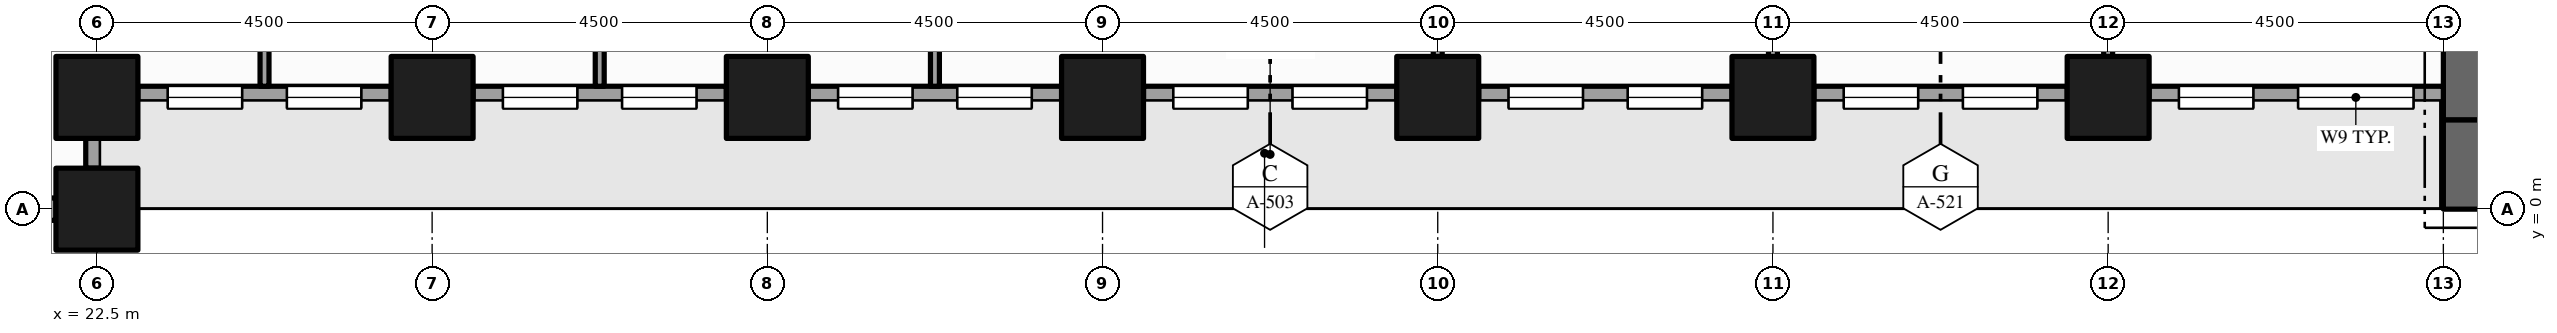
"""IFC4 building model, lengths in metres.
Left out: names, types, materials, properties, quantities, classifications, styles, units other than length and angle.
Written with IfcOpenShell. Run it as: python <this file> out.ifc"""

import sys

from ifc_helpers import new_model, si_unit, direction, frame, frame_2d, origin, origin_2d, place, context, subcontext, project, spatial, rectangle, hollow_rectangle, extrude, element, fill, save


model = new_model("IFC4")
c1 = context("Model", 3, precision=1e-05, world=origin(), true_north=direction((0.0, 1.0)))
c2 = subcontext(c1, "Body", "Model", "MODEL_VIEW")
j1 = project(units=[si_unit("LENGTHUNIT", "METRE"), si_unit("PLANEANGLEUNIT", "RADIAN")], contexts=[c1])
p1 = place(None, origin())
s1 = spatial("IfcSite", under=j1, at=p1, CompositionType="ELEMENT")
p2 = place(p1, origin())
s2 = spatial("IfcBuilding", under=s1, at=p2, CompositionType="ELEMENT")
p3 = place(p2, frame((0.0, 0.0, 29.0)))
s3 = spatial("IfcBuildingStorey", under=s2, at=p3, CompositionType="ELEMENT", Elevation=29.0)
p4 = place(p3, frame((67.5, 0.6, -0.15), z_axis=(0.0, 0.0, 1.0), x_axis=(-1.0, 0.0, 0.0)))
e1 = element("IfcWall", 1, at=p4, inside=s3, PredefinedType="SHEAR", context=c2, shape_type="SweptSolid", body=[
    extrude(rectangle(XDim=13.5, YDim=1.2, at=frame_2d((6.75, 0.0))), origin(), (0.0, 0.0, 1.0), 4.0),
])
p5 = place(p3, frame((54.6, 1.2, -0.15), z_axis=(0.0, 0.0, 1.0), x_axis=(0.0, 1.0, 0.0)))
e2 = element("IfcWall", 2, at=p5, inside=s3, PredefinedType="SHEAR", context=c2, shape_type="SweptSolid", body=[
    extrude(rectangle(XDim=20.1, YDim=1.2, at=frame_2d((10.05, 0.0))), origin(), (0.0, 0.0, 1.0), 4.0),
])
p6 = place(p5, frame((5.9, 0.0, 0.15)))
e3 = element("IfcOpeningElement", 3, at=p6, cuts=e2, PredefinedType="OPENING", context=c2, shape_type="SweptSolid", body=[
    extrude(rectangle(XDim=1.8, YDim=2.1, at=frame_2d((0.9, 1.05))), frame((0.0, 0.61, 0.0), z_axis=(0.0, -1.0, 0.0), x_axis=(1.0, 0.0, 0.0)), (0.0, 0.0, 1.0), 1.22),
])
p7 = place(p5, frame((11.95, 0.0, 0.15)))
e4 = element("IfcOpeningElement", 4, at=p7, cuts=e2, PredefinedType="OPENING", context=c2, shape_type="SweptSolid", body=[
    extrude(rectangle(XDim=1.1, YDim=2.1, at=frame_2d((0.55, 1.05))), frame((0.0, 0.61, 0.0), z_axis=(0.0, -1.0, 0.0), x_axis=(1.0, 0.0, 0.0)), (0.0, 0.0, 1.0), 1.22),
])
p8 = place(p5, frame((0.95, 0.0, 0.15)))
e5 = element("IfcOpeningElement", 5, at=p8, cuts=e2, PredefinedType="OPENING", context=c2, shape_type="SweptSolid", body=[
    extrude(rectangle(XDim=1.1, YDim=2.1, at=frame_2d((0.55, 1.05))), frame((0.0, 0.61, 0.0), z_axis=(0.0, -1.0, 0.0), x_axis=(1.0, 0.0, 0.0)), (0.0, 0.0, 1.0), 1.22),
])
p9 = place(p5, frame((18.15, 0.0, 0.15)))
e6 = element("IfcOpeningElement", 6, at=p9, cuts=e2, PredefinedType="OPENING", context=c2, shape_type="SweptSolid", body=[
    extrude(rectangle(XDim=1.1, YDim=2.1, at=frame_2d((0.55, 1.05))), frame((0.0, 0.61, 0.0), z_axis=(0.0, -1.0, 0.0), x_axis=(1.0, 0.0, 0.0)), (0.0, 0.0, 1.0), 1.22),
])
for number, where, z_axis, x_axis in (
    (7, (22.5, 0.0, -0.3), (0.0, 0.0, 1.0), (1.0, 0.0, 0.0)),
    (8, (22.5, 1.5, -0.3), (0.0, 0.0, 1.0), (1.0, 0.0, 0.0)),
    (9, (27.0, 1.5, -0.3), (0.0, 0.0, 1.0), (1.0, 0.0, 0.0)),
    (10, (31.5, 1.5, -0.3), (0.0, 0.0, 1.0), (1.0, 0.0, 0.0)),
    (11, (36.0, 1.5, -0.3), (0.0, 0.0, 1.0), (1.0, 0.0, 0.0)),
    (12, (40.5, 1.5, -0.3), (0.0, 0.0, 1.0), (1.0, 0.0, 0.0)),
    (13, (45.0, 1.5, -0.3), (0.0, 0.0, 1.0), (1.0, 0.0, 0.0)),
    (14, (49.5, 1.5, -0.3), (0.0, 0.0, 1.0), (1.0, 0.0, 0.0)),
):
    element("IfcColumn", number, at=place(p3, frame(where, z_axis=z_axis, x_axis=x_axis)), inside=s3, PredefinedType="COLUMN", context=c2, shape_type="SweptSolid", body=[
        extrude(hollow_rectangle(XDim=1.1, YDim=1.1, WallThickness=0.06, at=origin_2d()), origin(), (0.0, 0.0, 1.0), 4.15),
    ])
p10 = place(p3, frame((18.55, 0.0, 0.0), z_axis=(0.0, 0.0, 1.0), x_axis=(1.0, 0.0, 0.0)))
e15 = element("IfcWall", 15, at=p10, inside=s3, PredefinedType="STANDARD", context=c2, shape_type="SweptSolid", body=[
    extrude(rectangle(XDim=3.4, YDim=0.3, at=frame_2d((1.7, 0.0))), origin(), (0.0, 0.0, 1.0), 3.144),
])
p11 = place(p10, frame((0.4, 0.0, 0.9)))
e16 = element("IfcOpeningElement", 16, at=p11, cuts=e15, PredefinedType="OPENING", context=c2, shape_type="SweptSolid", body=[
    extrude(rectangle(XDim=1.0, YDim=2.0, at=frame_2d((0.5, 1.0))), frame((0.0, 0.16, 0.0), z_axis=(0.0, -1.0, 0.0), x_axis=(1.0, 0.0, 0.0)), (0.0, 0.0, 1.0), 0.32),
])
p12 = place(p10, frame((2.0, 0.0, 0.9)))
e17 = element("IfcOpeningElement", 17, at=p12, cuts=e15, PredefinedType="OPENING", context=c2, shape_type="SweptSolid", body=[
    extrude(rectangle(XDim=1.0, YDim=2.0, at=frame_2d((0.5, 1.0))), frame((0.0, 0.16, 0.0), z_axis=(0.0, -1.0, 0.0), x_axis=(1.0, 0.0, 0.0)), (0.0, 0.0, 1.0), 0.32),
])
p13 = place(p3, frame((22.5, 0.55, 0.0), z_axis=(0.0, 0.0, 1.0), x_axis=(0.0, 1.0, 0.0)))
e18 = element("IfcWall", 18, at=p13, inside=s3, PredefinedType="STANDARD", context=c2, shape_type="SweptSolid", body=[
    extrude(rectangle(XDim=0.4, YDim=0.3, at=frame_2d((0.2, 0.0))), origin(), (0.0, 0.0, 1.0), 3.144),
])
p14 = place(p3, frame((23.05, 1.5, 0.0), z_axis=(0.0, 0.0, 1.0), x_axis=(1.0, 0.0, 0.0)))
e19 = element("IfcWall", 19, at=p14, inside=s3, PredefinedType="STANDARD", context=c2, shape_type="SweptSolid", body=[
    extrude(rectangle(XDim=3.4, YDim=0.3, at=frame_2d((1.7, 0.0))), origin(), (0.0, 0.0, 1.0), 3.144),
])
p15 = place(p14, frame((0.4, 0.0, 0.9)))
e20 = element("IfcOpeningElement", 20, at=p15, cuts=e19, PredefinedType="OPENING", context=c2, shape_type="SweptSolid", body=[
    extrude(rectangle(XDim=1.0, YDim=2.0, at=frame_2d((0.5, 1.0))), frame((0.0, 0.16, 0.0), z_axis=(0.0, -1.0, 0.0), x_axis=(1.0, 0.0, 0.0)), (0.0, 0.0, 1.0), 0.32),
])
p16 = place(p14, frame((2.0, 0.0, 0.9)))
e21 = element("IfcOpeningElement", 21, at=p16, cuts=e19, PredefinedType="OPENING", context=c2, shape_type="SweptSolid", body=[
    extrude(rectangle(XDim=1.0, YDim=2.0, at=frame_2d((0.5, 1.0))), frame((0.0, 0.16, 0.0), z_axis=(0.0, -1.0, 0.0), x_axis=(1.0, 0.0, 0.0)), (0.0, 0.0, 1.0), 0.32),
])
p17 = place(p3, frame((27.55, 1.5, 0.0), z_axis=(0.0, 0.0, 1.0), x_axis=(1.0, 0.0, 0.0)))
e22 = element("IfcWall", 22, at=p17, inside=s3, PredefinedType="STANDARD", context=c2, shape_type="SweptSolid", body=[
    extrude(rectangle(XDim=3.4, YDim=0.3, at=frame_2d((1.7, 0.0))), origin(), (0.0, 0.0, 1.0), 3.144),
])
p18 = place(p17, frame((0.4, 0.0, 0.9)))
e23 = element("IfcOpeningElement", 23, at=p18, cuts=e22, PredefinedType="OPENING", context=c2, shape_type="SweptSolid", body=[
    extrude(rectangle(XDim=1.0, YDim=2.0, at=frame_2d((0.5, 1.0))), frame((0.0, 0.16, 0.0), z_axis=(0.0, -1.0, 0.0), x_axis=(1.0, 0.0, 0.0)), (0.0, 0.0, 1.0), 0.32),
])
p19 = place(p17, frame((2.0, 0.0, 0.9)))
e24 = element("IfcOpeningElement", 24, at=p19, cuts=e22, PredefinedType="OPENING", context=c2, shape_type="SweptSolid", body=[
    extrude(rectangle(XDim=1.0, YDim=2.0, at=frame_2d((0.5, 1.0))), frame((0.0, 0.16, 0.0), z_axis=(0.0, -1.0, 0.0), x_axis=(1.0, 0.0, 0.0)), (0.0, 0.0, 1.0), 0.32),
])
p20 = place(p3, frame((32.05, 1.5, 0.0), z_axis=(0.0, 0.0, 1.0), x_axis=(1.0, 0.0, 0.0)))
e25 = element("IfcWall", 25, at=p20, inside=s3, PredefinedType="STANDARD", context=c2, shape_type="SweptSolid", body=[
    extrude(rectangle(XDim=3.4, YDim=0.3, at=frame_2d((1.7, 0.0))), origin(), (0.0, 0.0, 1.0), 3.144),
])
p21 = place(p20, frame((0.4, 0.0, 0.9)))
e26 = element("IfcOpeningElement", 26, at=p21, cuts=e25, PredefinedType="OPENING", context=c2, shape_type="SweptSolid", body=[
    extrude(rectangle(XDim=1.0, YDim=2.0, at=frame_2d((0.5, 1.0))), frame((0.0, 0.16, 0.0), z_axis=(0.0, -1.0, 0.0), x_axis=(1.0, 0.0, 0.0)), (0.0, 0.0, 1.0), 0.32),
])
p22 = place(p20, frame((2.0, 0.0, 0.9)))
e27 = element("IfcOpeningElement", 27, at=p22, cuts=e25, PredefinedType="OPENING", context=c2, shape_type="SweptSolid", body=[
    extrude(rectangle(XDim=1.0, YDim=2.0, at=frame_2d((0.5, 1.0))), frame((0.0, 0.16, 0.0), z_axis=(0.0, -1.0, 0.0), x_axis=(1.0, 0.0, 0.0)), (0.0, 0.0, 1.0), 0.32),
])
p23 = place(p3, frame((36.55, 1.5, 0.0), z_axis=(0.0, 0.0, 1.0), x_axis=(1.0, 0.0, 0.0)))
e28 = element("IfcWall", 28, at=p23, inside=s3, PredefinedType="STANDARD", context=c2, shape_type="SweptSolid", body=[
    extrude(rectangle(XDim=3.4, YDim=0.3, at=frame_2d((1.7, 0.0))), origin(), (0.0, 0.0, 1.0), 3.144),
])
p24 = place(p23, frame((0.4, 0.0, 0.9)))
e29 = element("IfcOpeningElement", 29, at=p24, cuts=e28, PredefinedType="OPENING", context=c2, shape_type="SweptSolid", body=[
    extrude(rectangle(XDim=1.0, YDim=2.0, at=frame_2d((0.5, 1.0))), frame((0.0, 0.16, 0.0), z_axis=(0.0, -1.0, 0.0), x_axis=(1.0, 0.0, 0.0)), (0.0, 0.0, 1.0), 0.32),
])
p25 = place(p23, frame((2.0, 0.0, 0.9)))
e30 = element("IfcOpeningElement", 30, at=p25, cuts=e28, PredefinedType="OPENING", context=c2, shape_type="SweptSolid", body=[
    extrude(rectangle(XDim=1.0, YDim=2.0, at=frame_2d((0.5, 1.0))), frame((0.0, 0.16, 0.0), z_axis=(0.0, -1.0, 0.0), x_axis=(1.0, 0.0, 0.0)), (0.0, 0.0, 1.0), 0.32),
])
p26 = place(p3, frame((41.05, 1.5, 0.0), z_axis=(0.0, 0.0, 1.0), x_axis=(1.0, 0.0, 0.0)))
e31 = element("IfcWall", 31, at=p26, inside=s3, PredefinedType="STANDARD", context=c2, shape_type="SweptSolid", body=[
    extrude(rectangle(XDim=3.4, YDim=0.3, at=frame_2d((1.7, 0.0))), origin(), (0.0, 0.0, 1.0), 3.144),
])
p27 = place(p26, frame((0.4, 0.0, 0.9)))
e32 = element("IfcOpeningElement", 32, at=p27, cuts=e31, PredefinedType="OPENING", context=c2, shape_type="SweptSolid", body=[
    extrude(rectangle(XDim=1.0, YDim=2.0, at=frame_2d((0.5, 1.0))), frame((0.0, 0.16, 0.0), z_axis=(0.0, -1.0, 0.0), x_axis=(1.0, 0.0, 0.0)), (0.0, 0.0, 1.0), 0.32),
])
p28 = place(p26, frame((2.0, 0.0, 0.9)))
e33 = element("IfcOpeningElement", 33, at=p28, cuts=e31, PredefinedType="OPENING", context=c2, shape_type="SweptSolid", body=[
    extrude(rectangle(XDim=1.0, YDim=2.0, at=frame_2d((0.5, 1.0))), frame((0.0, 0.16, 0.0), z_axis=(0.0, -1.0, 0.0), x_axis=(1.0, 0.0, 0.0)), (0.0, 0.0, 1.0), 0.32),
])
p29 = place(p3, frame((45.55, 1.5, 0.0), z_axis=(0.0, 0.0, 1.0), x_axis=(1.0, 0.0, 0.0)))
e34 = element("IfcWall", 34, at=p29, inside=s3, PredefinedType="STANDARD", context=c2, shape_type="SweptSolid", body=[
    extrude(rectangle(XDim=3.4, YDim=0.3, at=frame_2d((1.7, 0.0))), origin(), (0.0, 0.0, 1.0), 3.144),
])
p30 = place(p29, frame((0.4, 0.0, 0.9)))
e35 = element("IfcOpeningElement", 35, at=p30, cuts=e34, PredefinedType="OPENING", context=c2, shape_type="SweptSolid", body=[
    extrude(rectangle(XDim=1.0, YDim=2.0, at=frame_2d((0.5, 1.0))), frame((0.0, 0.16, 0.0), z_axis=(0.0, -1.0, 0.0), x_axis=(1.0, 0.0, 0.0)), (0.0, 0.0, 1.0), 0.32),
])
p31 = place(p29, frame((2.0, 0.0, 0.9)))
e36 = element("IfcOpeningElement", 36, at=p31, cuts=e34, PredefinedType="OPENING", context=c2, shape_type="SweptSolid", body=[
    extrude(rectangle(XDim=1.0, YDim=2.0, at=frame_2d((0.5, 1.0))), frame((0.0, 0.16, 0.0), z_axis=(0.0, -1.0, 0.0), x_axis=(1.0, 0.0, 0.0)), (0.0, 0.0, 1.0), 0.32),
])
p32 = place(p3, frame((50.05, 1.5, 0.0), z_axis=(0.0, 0.0, 1.0), x_axis=(1.0, 0.0, 0.0)))
e37 = element("IfcWall", 37, at=p32, inside=s3, PredefinedType="STANDARD", context=c2, shape_type="SweptSolid", body=[
    extrude(rectangle(XDim=3.95, YDim=0.3, at=frame_2d((1.975, 0.0))), origin(), (0.0, 0.0, 1.0), 3.144),
])
p33 = place(p32, frame((0.4, 0.0, 0.9)))
e38 = element("IfcOpeningElement", 38, at=p33, cuts=e37, PredefinedType="OPENING", context=c2, shape_type="SweptSolid", body=[
    extrude(rectangle(XDim=1.0, YDim=2.0, at=frame_2d((0.5, 1.0))), frame((0.0, 0.16, 0.0), z_axis=(0.0, -1.0, 0.0), x_axis=(1.0, 0.0, 0.0)), (0.0, 0.0, 1.0), 0.32),
])
p34 = place(p32, frame((2.0, 0.0, 0.9)))
e39 = element("IfcOpeningElement", 39, at=p34, cuts=e37, PredefinedType="OPENING", context=c2, shape_type="SweptSolid", body=[
    extrude(rectangle(XDim=1.55, YDim=2.0, at=frame_2d((0.775, 1.0))), frame((0.0, 0.16, 0.0), z_axis=(0.0, -1.0, 0.0), x_axis=(1.0, 0.0, 0.0)), (0.0, 0.0, 1.0), 0.32),
])
for number, where, z_axis, x_axis in (
    (40, (24.75, 1.65, 0.0), (0.0, 0.0, 1.0), (0.0, 1.0, 0.0)),
    (41, (29.25, 1.65, 0.0), (0.0, 0.0, 1.0), (0.0, 1.0, 0.0)),
    (42, (33.75, 1.65, 0.0), (0.0, 0.0, 1.0), (0.0, 1.0, 0.0)),
    (43, (40.5, 1.65, 0.0), (0.0, 0.0, 1.0), (0.0, 1.0, 0.0)),
    (44, (45.0, 1.65, 0.0), (0.0, 0.0, 1.0), (0.0, 1.0, 0.0)),
):
    element("IfcWall", number, at=place(p3, frame(where, z_axis=z_axis, x_axis=x_axis)), inside=s3, PredefinedType="PARTITIONING", context=c2, shape_type="SweptSolid", body=[
        extrude(rectangle(XDim=7.65, YDim=0.12, at=frame_2d((3.825, 0.0))), origin(), (0.0, 0.0, 1.0), 2.938),
    ])
p35 = place(p3, frame((49.5, 1.65, 0.0), z_axis=(0.0, 0.0, 1.0), x_axis=(0.0, 1.0, 0.0)))
e45 = element("IfcWall", 45, at=p35, inside=s3, PredefinedType="PARTITIONING", context=c2, shape_type="SweptSolid", body=[
    extrude(rectangle(XDim=22.2, YDim=0.12, at=frame_2d((11.1, 0.0))), origin(), (0.0, 0.0, 1.0), 2.938),
])
p36 = place(p35, frame((7.575, 0.0, 0.0)))
e46 = element("IfcOpeningElement", 46, at=p36, cuts=e45, PredefinedType="OPENING", context=c2, shape_type="SweptSolid", body=[
    extrude(rectangle(XDim=1.8, YDim=2.1, at=frame_2d((0.9, 1.05))), frame((0.0, 0.07, 0.0), z_axis=(0.0, -1.0, 0.0), x_axis=(1.0, 0.0, 0.0)), (0.0, 0.0, 1.0), 0.14),
])
p37 = place(p35, frame((0.85, 0.0, 0.0)))
e47 = element("IfcOpeningElement", 47, at=p37, cuts=e45, PredefinedType="OPENING", context=c2, shape_type="SweptSolid", body=[
    extrude(rectangle(XDim=0.9, YDim=2.1, at=frame_2d((0.45, 1.05))), frame((0.0, 0.07, 0.0), z_axis=(0.0, -1.0, 0.0), x_axis=(1.0, 0.0, 0.0)), (0.0, 0.0, 1.0), 0.14),
])
p38 = place(p35, frame((3.15, 0.0, 0.0)))
e48 = element("IfcOpeningElement", 48, at=p38, cuts=e45, PredefinedType="OPENING", context=c2, shape_type="SweptSolid", body=[
    extrude(rectangle(XDim=0.9, YDim=2.1, at=frame_2d((0.45, 1.05))), frame((0.0, 0.07, 0.0), z_axis=(0.0, -1.0, 0.0), x_axis=(1.0, 0.0, 0.0)), (0.0, 0.0, 1.0), 0.14),
])
p39 = place(p35, frame((5.35, 0.0, 0.0)))
e49 = element("IfcOpeningElement", 49, at=p39, cuts=e45, PredefinedType="OPENING", context=c2, shape_type="SweptSolid", body=[
    extrude(rectangle(XDim=1.0, YDim=2.1, at=frame_2d((0.5, 1.05))), frame((0.0, 0.07, 0.0), z_axis=(0.0, -1.0, 0.0), x_axis=(1.0, 0.0, 0.0)), (0.0, 0.0, 1.0), 0.14),
])
p40 = place(p15, origin())
e50 = element("IfcWindow", 50, at=p40, inside=s3, PartitioningType="SINGLE_PANEL", PredefinedType="WINDOW", context=c2, shape_type="SweptSolid", body=[
    extrude(rectangle(XDim=1.0, YDim=2.0, at=frame_2d((0.5, 1.0))), frame((0.0, 0.03, 0.0), z_axis=(0.0, -1.0, 0.0), x_axis=(1.0, 0.0, 0.0)), (0.0, 0.0, 1.0), 0.06),
])
fill(e20, e50)
p41 = place(p16, origin())
e51 = element("IfcWindow", 51, at=p41, inside=s3, PartitioningType="SINGLE_PANEL", PredefinedType="WINDOW", context=c2, shape_type="SweptSolid", body=[
    extrude(rectangle(XDim=1.0, YDim=2.0, at=frame_2d((0.5, 1.0))), frame((0.0, 0.03, 0.0), z_axis=(0.0, -1.0, 0.0), x_axis=(1.0, 0.0, 0.0)), (0.0, 0.0, 1.0), 0.06),
])
fill(e21, e51)
p42 = place(p18, origin())
e52 = element("IfcWindow", 52, at=p42, inside=s3, PartitioningType="SINGLE_PANEL", PredefinedType="WINDOW", context=c2, shape_type="SweptSolid", body=[
    extrude(rectangle(XDim=1.0, YDim=2.0, at=frame_2d((0.5, 1.0))), frame((0.0, 0.03, 0.0), z_axis=(0.0, -1.0, 0.0), x_axis=(1.0, 0.0, 0.0)), (0.0, 0.0, 1.0), 0.06),
])
fill(e23, e52)
p43 = place(p19, origin())
e53 = element("IfcWindow", 53, at=p43, inside=s3, PartitioningType="SINGLE_PANEL", PredefinedType="WINDOW", context=c2, shape_type="SweptSolid", body=[
    extrude(rectangle(XDim=1.0, YDim=2.0, at=frame_2d((0.5, 1.0))), frame((0.0, 0.03, 0.0), z_axis=(0.0, -1.0, 0.0), x_axis=(1.0, 0.0, 0.0)), (0.0, 0.0, 1.0), 0.06),
])
fill(e24, e53)
p44 = place(p21, origin())
e54 = element("IfcWindow", 54, at=p44, inside=s3, PartitioningType="SINGLE_PANEL", PredefinedType="WINDOW", context=c2, shape_type="SweptSolid", body=[
    extrude(rectangle(XDim=1.0, YDim=2.0, at=frame_2d((0.5, 1.0))), frame((0.0, 0.03, 0.0), z_axis=(0.0, -1.0, 0.0), x_axis=(1.0, 0.0, 0.0)), (0.0, 0.0, 1.0), 0.06),
])
fill(e26, e54)
p45 = place(p22, origin())
e55 = element("IfcWindow", 55, at=p45, inside=s3, PartitioningType="SINGLE_PANEL", PredefinedType="WINDOW", context=c2, shape_type="SweptSolid", body=[
    extrude(rectangle(XDim=1.0, YDim=2.0, at=frame_2d((0.5, 1.0))), frame((0.0, 0.03, 0.0), z_axis=(0.0, -1.0, 0.0), x_axis=(1.0, 0.0, 0.0)), (0.0, 0.0, 1.0), 0.06),
])
fill(e27, e55)
p46 = place(p24, origin())
e56 = element("IfcWindow", 56, at=p46, inside=s3, PartitioningType="SINGLE_PANEL", PredefinedType="WINDOW", context=c2, shape_type="SweptSolid", body=[
    extrude(rectangle(XDim=1.0, YDim=2.0, at=frame_2d((0.5, 1.0))), frame((0.0, 0.03, 0.0), z_axis=(0.0, -1.0, 0.0), x_axis=(1.0, 0.0, 0.0)), (0.0, 0.0, 1.0), 0.06),
])
fill(e29, e56)
p47 = place(p25, origin())
e57 = element("IfcWindow", 57, at=p47, inside=s3, PartitioningType="SINGLE_PANEL", PredefinedType="WINDOW", context=c2, shape_type="SweptSolid", body=[
    extrude(rectangle(XDim=1.0, YDim=2.0, at=frame_2d((0.5, 1.0))), frame((0.0, 0.03, 0.0), z_axis=(0.0, -1.0, 0.0), x_axis=(1.0, 0.0, 0.0)), (0.0, 0.0, 1.0), 0.06),
])
fill(e30, e57)
p48 = place(p27, origin())
e58 = element("IfcWindow", 58, at=p48, inside=s3, PartitioningType="SINGLE_PANEL", PredefinedType="WINDOW", context=c2, shape_type="SweptSolid", body=[
    extrude(rectangle(XDim=1.0, YDim=2.0, at=frame_2d((0.5, 1.0))), frame((0.0, 0.03, 0.0), z_axis=(0.0, -1.0, 0.0), x_axis=(1.0, 0.0, 0.0)), (0.0, 0.0, 1.0), 0.06),
])
fill(e32, e58)
p49 = place(p28, origin())
e59 = element("IfcWindow", 59, at=p49, inside=s3, PartitioningType="SINGLE_PANEL", PredefinedType="WINDOW", context=c2, shape_type="SweptSolid", body=[
    extrude(rectangle(XDim=1.0, YDim=2.0, at=frame_2d((0.5, 1.0))), frame((0.0, 0.03, 0.0), z_axis=(0.0, -1.0, 0.0), x_axis=(1.0, 0.0, 0.0)), (0.0, 0.0, 1.0), 0.06),
])
fill(e33, e59)
p50 = place(p30, origin())
e60 = element("IfcWindow", 60, at=p50, inside=s3, PartitioningType="SINGLE_PANEL", PredefinedType="WINDOW", context=c2, shape_type="SweptSolid", body=[
    extrude(rectangle(XDim=1.0, YDim=2.0, at=frame_2d((0.5, 1.0))), frame((0.0, 0.03, 0.0), z_axis=(0.0, -1.0, 0.0), x_axis=(1.0, 0.0, 0.0)), (0.0, 0.0, 1.0), 0.06),
])
fill(e35, e60)
p51 = place(p31, origin())
e61 = element("IfcWindow", 61, at=p51, inside=s3, PartitioningType="SINGLE_PANEL", PredefinedType="WINDOW", context=c2, shape_type="SweptSolid", body=[
    extrude(rectangle(XDim=1.0, YDim=2.0, at=frame_2d((0.5, 1.0))), frame((0.0, 0.03, 0.0), z_axis=(0.0, -1.0, 0.0), x_axis=(1.0, 0.0, 0.0)), (0.0, 0.0, 1.0), 0.06),
])
fill(e36, e61)
p52 = place(p33, origin())
e62 = element("IfcWindow", 62, at=p52, inside=s3, PartitioningType="SINGLE_PANEL", PredefinedType="WINDOW", context=c2, shape_type="SweptSolid", body=[
    extrude(rectangle(XDim=1.0, YDim=2.0, at=frame_2d((0.5, 1.0))), frame((0.0, 0.03, 0.0), z_axis=(0.0, -1.0, 0.0), x_axis=(1.0, 0.0, 0.0)), (0.0, 0.0, 1.0), 0.06),
])
fill(e38, e62)
p53 = place(p34, origin())
e63 = element("IfcWindow", 63, at=p53, inside=s3, PartitioningType="SINGLE_PANEL", PredefinedType="WINDOW", context=c2, shape_type="SweptSolid", body=[
    extrude(rectangle(XDim=1.55, YDim=2.0, at=frame_2d((0.775, 1.0))), frame((0.0, 0.03, 0.0), z_axis=(0.0, -1.0, 0.0), x_axis=(1.0, 0.0, 0.0)), (0.0, 0.0, 1.0), 0.06),
])
fill(e39, e63)
save(model, sys.argv[1])
